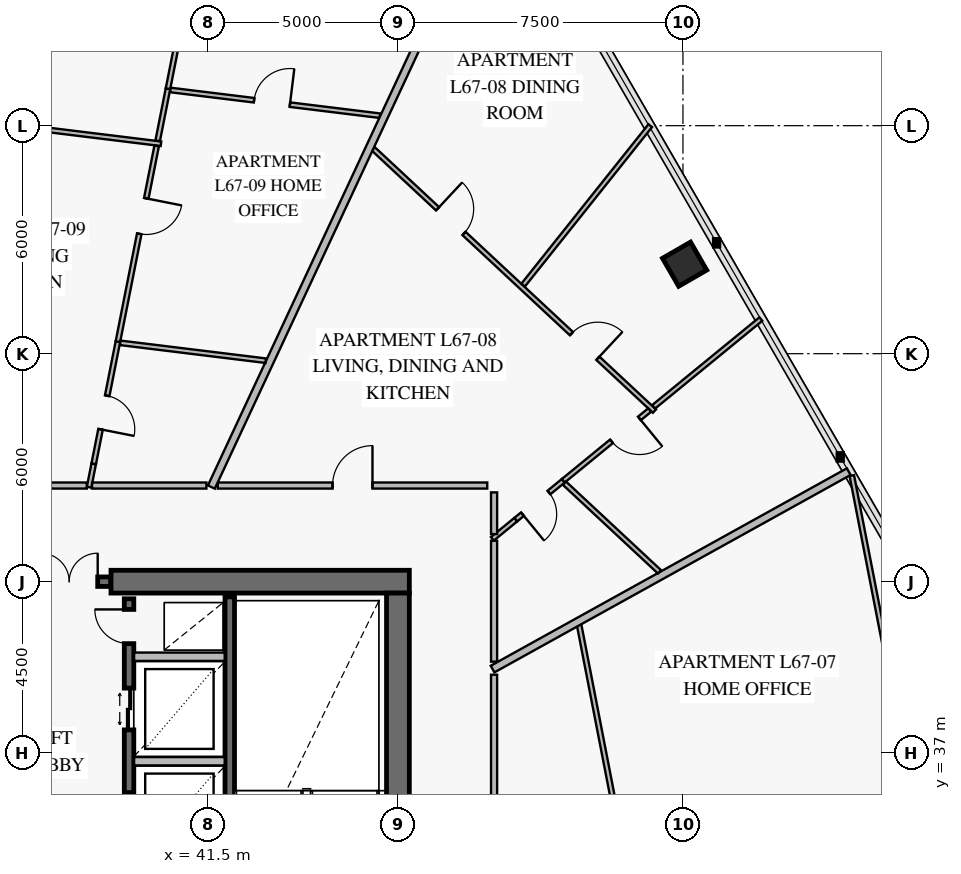
"""IFC4 building model, lengths in metres.
Left out: names, types, materials, properties, quantities, classifications, styles, units other than length and angle.
Written with IfcOpenShell. Run it as: python <this file> out.ifc"""

import sys

from ifc_helpers import new_model, si_unit, direction, frame, frame_2d, origin, origin_2d, place, context, subcontext, project, spatial, rectangle, extrude, element, fill, save


model = new_model("IFC4")
c1 = context("Model", 3, precision=1e-05, world=origin(), true_north=direction((0.0, 1.0)))
c2 = subcontext(c1, "Body", "Model", "MODEL_VIEW")
j1 = project(units=[si_unit("LENGTHUNIT", "METRE"), si_unit("PLANEANGLEUNIT", "RADIAN")], contexts=[c1])
p1 = place(None, origin())
s1 = spatial("IfcSite", under=j1, at=p1, CompositionType="ELEMENT")
p2 = place(p1, origin())
s2 = spatial("IfcBuilding", under=s1, at=p2, CompositionType="ELEMENT")
p3 = place(p2, frame((0.0, 0.0, 265.4)))
s3 = spatial("IfcBuildingStorey", under=s2, at=p3, CompositionType="ELEMENT", Elevation=265.4)
p4 = place(p3, frame((46.8, 41.5, 0.0), z_axis=(0.0, 0.0, 1.0), x_axis=(-1.0, 0.0, 0.0)))
e1 = element("IfcWall", 1, at=p4, inside=s3, PredefinedType="SHEAR", context=c2, shape_type="SweptSolid", body=[
    extrude(rectangle(XDim=7.85, YDim=0.6, at=frame_2d((3.925, 0.0))), origin(), (0.0, 0.0, 1.0), 3.8),
])
p5 = place(p3, frame((46.5, 22.8, 0.0), z_axis=(0.0, 0.0, 1.0), x_axis=(0.0, 1.0, 0.0)))
e2 = element("IfcWall", 2, at=p5, inside=s3, PredefinedType="SHEAR", context=c2, shape_type="SweptSolid", body=[
    extrude(rectangle(XDim=18.4, YDim=0.6, at=frame_2d((9.2, 0.0))), origin(), (0.0, 0.0, 1.0), 3.8),
])
p6 = place(p5, frame((8.95, 0.0, 0.0)))
e3 = element("IfcOpeningElement", 3, at=p6, cuts=e2, PredefinedType="OPENING", context=c2, shape_type="SweptSolid", body=[
    extrude(rectangle(XDim=1.1, YDim=2.15, at=frame_2d((0.55, 1.075))), frame((0.0, 0.312, 0.0), z_axis=(0.0, -1.0, 0.0), x_axis=(1.0, 0.0, 0.0)), (0.0, 0.0, 1.0), 0.624),
])
p7 = place(p3, frame((54.044, 49.855, 0.0), z_axis=(0.0, 0.0, 1.0), x_axis=(-0.5, 0.866025403784, 0.0)))
e4 = element("IfcColumn", 4, at=p7, inside=s3, PredefinedType="COLUMN", context=c2, shape_type="SweptSolid", body=[
    extrude(rectangle(XDim=0.85, YDim=0.85, at=origin_2d()), origin(), (0.0, 0.0, 1.0), 3.55),
])
p8 = place(p3, frame((36.76, 41.5, 0.0), z_axis=(0.0, 0.0, 1.0), x_axis=(1.0, 0.0, 0.0)))
e5 = element("IfcWall", 5, at=p8, inside=s3, PredefinedType="SOLIDWALL", context=c2, shape_type="SweptSolid", body=[
    extrude(rectangle(XDim=2.18, YDim=0.25, at=frame_2d((1.09, 0.0))), origin(), (0.0, 0.0, 1.0), 3.8),
])
p9 = place(p8, frame((0.34, 0.0, 0.0)))
e6 = element("IfcOpeningElement", 6, at=p9, cuts=e5, PredefinedType="OPENING", context=c2, shape_type="SweptSolid", body=[
    extrude(rectangle(XDim=1.5, YDim=2.15, at=frame_2d((0.75, 1.075))), frame((0.0, 0.137, 0.0), z_axis=(0.0, -1.0, 0.0), x_axis=(1.0, 0.0, 0.0)), (0.0, 0.0, 1.0), 0.274),
])
p10 = place(p3, frame((42.075, 31.4, 0.0), z_axis=(0.0, 0.0, 1.0), x_axis=(0.0, 1.0, 0.0)))
e7 = element("IfcWall", 7, at=p10, inside=s3, PredefinedType="SOLIDWALL", context=c2, shape_type="SweptSolid", body=[
    extrude(rectangle(XDim=9.7, YDim=0.25, at=frame_2d((4.85, 0.0))), origin(), (0.0, 0.0, 1.0), 3.8),
])
p11 = place(p3, frame((39.425, 31.4, 0.0), z_axis=(0.0, 0.0, 1.0), x_axis=(0.0, 1.0, 0.0)))
e8 = element("IfcWall", 8, at=p11, inside=s3, PredefinedType="SOLIDWALL", context=c2, shape_type="SweptSolid", body=[
    extrude(rectangle(XDim=9.65, YDim=0.25, at=frame_2d((4.825, 0.0))), origin(), (0.0, 0.0, 1.0), 3.8),
])
p12 = place(p11, frame((0.7, 0.0, 0.0)))
e9 = element("IfcOpeningElement", 9, at=p12, cuts=e8, PredefinedType="OPENING", context=c2, shape_type="SweptSolid", body=[
    extrude(rectangle(XDim=1.1, YDim=2.2, at=frame_2d((0.55, 1.1))), frame((0.0, 0.137, 0.0), z_axis=(0.0, -1.0, 0.0), x_axis=(1.0, 0.0, 0.0)), (0.0, 0.0, 1.0), 0.274),
])
p13 = place(p11, frame((3.45, 0.0, 0.0)))
e10 = element("IfcOpeningElement", 10, at=p13, cuts=e8, PredefinedType="OPENING", context=c2, shape_type="SweptSolid", body=[
    extrude(rectangle(XDim=1.1, YDim=2.2, at=frame_2d((0.55, 1.1))), frame((0.0, 0.137, 0.0), z_axis=(0.0, -1.0, 0.0), x_axis=(1.0, 0.0, 0.0)), (0.0, 0.0, 1.0), 0.274),
])
p14 = place(p11, frame((6.2, 0.0, 0.0)))
e11 = element("IfcOpeningElement", 11, at=p14, cuts=e8, PredefinedType="OPENING", context=c2, shape_type="SweptSolid", body=[
    extrude(rectangle(XDim=1.1, YDim=2.2, at=frame_2d((0.55, 1.1))), frame((0.0, 0.137, 0.0), z_axis=(0.0, -1.0, 0.0), x_axis=(1.0, 0.0, 0.0)), (0.0, 0.0, 1.0), 0.274),
])
p15 = place(p11, frame((8.47, 0.0, 0.0)))
e12 = element("IfcOpeningElement", 12, at=p15, cuts=e8, PredefinedType="OPENING", context=c2, shape_type="SweptSolid", body=[
    extrude(rectangle(XDim=0.9, YDim=2.1, at=frame_2d((0.45, 1.05))), frame((0.0, 0.137, 0.0), z_axis=(0.0, -1.0, 0.0), x_axis=(1.0, 0.0, 0.0)), (0.0, 0.0, 1.0), 0.274),
])
p16 = place(p3, frame((60.257, 34.961, 0.0), z_axis=(0.0, 0.0, 1.0), x_axis=(-0.190833223762, 0.981622473616, 0.0)))
e13 = element("IfcWall", 13, at=p16, inside=s3, PredefinedType="PARTITIONING", context=c2, shape_type="SweptSolid", body=[
    extrude(rectangle(XDim=9.506, YDim=0.12, at=frame_2d((4.753, 0.0))), origin(), (0.0, 0.0, 1.0), 2.93),
])
p17 = place(p16, frame((1.553, 0.0, 0.0)))
e14 = element("IfcOpeningElement", 14, at=p17, cuts=e13, PredefinedType="OPENING", context=c2, shape_type="SweptSolid", body=[
    extrude(rectangle(XDim=0.95, YDim=2.1, at=frame_2d((0.475, 1.05))), frame((0.0, 0.072, 0.0), z_axis=(0.0, -1.0, 0.0), x_axis=(1.0, 0.0, 0.0)), (0.0, 0.0, 1.0), 0.144),
])
p18 = place(p3, frame((53.25, 45.99, 0.0), z_axis=(0.0, 0.0, 1.0), x_axis=(-0.731343343845, 0.682009467246, 0.0)))
e15 = element("IfcWall", 15, at=p18, inside=s3, PredefinedType="PARTITIONING", context=c2, shape_type="SweptSolid", body=[
    extrude(rectangle(XDim=10.115, YDim=0.12, at=frame_2d((5.058, 0.0))), origin(), (0.0, 0.0, 1.0), 2.95),
])
p19 = place(p18, frame((2.037, 0.0, 0.0)))
e16 = element("IfcOpeningElement", 16, at=p19, cuts=e15, PredefinedType="OPENING", context=c2, shape_type="SweptSolid", body=[
    extrude(rectangle(XDim=0.95, YDim=2.1, at=frame_2d((0.475, 1.05))), frame((0.0, 0.072, 0.0), z_axis=(0.0, -1.0, 0.0), x_axis=(1.0, 0.0, 0.0)), (0.0, 0.0, 1.0), 0.144),
])
p20 = place(p18, frame((6.854, 0.0, 0.0)))
e17 = element("IfcOpeningElement", 17, at=p20, cuts=e15, PredefinedType="OPENING", context=c2, shape_type="SweptSolid", body=[
    extrude(rectangle(XDim=0.95, YDim=2.1, at=frame_2d((0.475, 1.05))), frame((0.0, 0.072, 0.0), z_axis=(0.0, -1.0, 0.0), x_axis=(1.0, 0.0, 0.0)), (0.0, 0.0, 1.0), 0.144),
])
p21 = place(p3, frame((49.6, 43.132, 0.0), z_axis=(0.0, 0.0, 1.0), x_axis=(0.773876497014, 0.633336535635, 0.0)))
e18 = element("IfcWall", 18, at=p21, inside=s3, PredefinedType="PARTITIONING", context=c2, shape_type="SweptSolid", body=[
    extrude(rectangle(XDim=1.615, YDim=0.12, at=frame_2d((0.808, 0.0))), origin(), (0.0, 0.0, 1.0), 3.55),
])
p22 = place(p21, frame((0.229, 0.0, 0.0)))
e19 = element("IfcOpeningElement", 19, at=p22, cuts=e18, PredefinedType="OPENING", context=c2, shape_type="SweptSolid", body=[
    extrude(rectangle(XDim=0.9, YDim=2.1, at=frame_2d((0.45, 1.05))), frame((0.0, 0.072, 0.0), z_axis=(0.0, -1.0, 0.0), x_axis=(1.0, 0.0, 0.0)), (0.0, 0.0, 1.0), 0.144),
])
p23 = place(p3, frame((50.85, 44.155, 0.0), z_axis=(0.0, 0.0, 1.0), x_axis=(0.773805447129, 0.633423341844, 0.0)))
e20 = element("IfcWall", 20, at=p23, inside=s3, PredefinedType="PARTITIONING", context=c2, shape_type="SweptSolid", body=[
    extrude(rectangle(XDim=2.937, YDim=0.12, at=frame_2d((1.469, 0.0))), origin(), (0.0, 0.0, 1.0), 3.15),
])
p24 = place(p23, frame((1.641, 0.0, 0.0)))
e21 = element("IfcOpeningElement", 21, at=p24, cuts=e20, PredefinedType="OPENING", context=c2, shape_type="SweptSolid", body=[
    extrude(rectangle(XDim=0.95, YDim=2.1, at=frame_2d((0.475, 1.05))), frame((0.0, 0.072, 0.0), z_axis=(0.0, -1.0, 0.0), x_axis=(1.0, 0.0, 0.0)), (0.0, 0.0, 1.0), 0.144),
])
p25 = place(p3, frame((53.229, 46.102, 0.0), z_axis=(0.0, 0.0, 1.0), x_axis=(0.773858778819, 0.633358184951, 0.0)))
e22 = element("IfcWall", 22, at=p25, inside=s3, PredefinedType="PARTITIONING", context=c2, shape_type="SweptSolid", body=[
    extrude(rectangle(XDim=3.644, YDim=0.12, at=frame_2d((1.822, 0.0))), origin(), (0.0, 0.0, 1.0), 2.93),
])
p26 = place(p3, frame((48.85, 44.03, 0.0), z_axis=(0.0, 0.0, 1.0), x_axis=(-1.0, 0.0, 0.0)))
e23 = element("IfcWall", 23, at=p26, inside=s3, PredefinedType="PARTITIONING", context=c2, shape_type="SweptSolid", body=[
    extrude(rectangle(XDim=7.09, YDim=0.16, at=frame_2d((3.545, 0.0))), origin(), (0.0, 0.0, 1.0), 2.95),
])
p27 = place(p26, frame((3.02, 0.0, 0.0)))
e24 = element("IfcOpeningElement", 24, at=p27, cuts=e23, PredefinedType="OPENING", context=c2, shape_type="SweptSolid", body=[
    extrude(rectangle(XDim=1.05, YDim=2.15, at=frame_2d((0.525, 1.075))), frame((0.0, 0.092, 0.0), z_axis=(0.0, -1.0, 0.0), x_axis=(1.0, 0.0, 0.0)), (0.0, 0.0, 1.0), 0.184),
])
p28 = place(p3, frame((40.265, 53.024, 0.0), z_axis=(0.0, 0.0, 1.0), x_axis=(-0.992544489296, 0.121882881359, 0.0)))
e25 = element("IfcWall", 25, at=p28, inside=s3, PredefinedType="PARTITIONING", context=c2, shape_type="SweptSolid", body=[
    extrude(rectangle(XDim=8.519, YDim=0.12, at=frame_2d((4.26, 0.0))), origin(), (0.0, 0.0, 1.0), 3.55),
])
p29 = place(p28, frame((3.784, 0.0, 0.0)))
e26 = element("IfcOpeningElement", 26, at=p29, cuts=e25, PredefinedType="OPENING", context=c2, shape_type="SweptSolid", body=[
    extrude(rectangle(XDim=0.95, YDim=2.1, at=frame_2d((0.475, 1.05))), frame((0.0, 0.072, 0.0), z_axis=(0.0, -1.0, 0.0), x_axis=(1.0, 0.0, 0.0)), (0.0, 0.0, 1.0), 0.144),
])
p30 = place(p3, frame((38.495, 44.6, 0.0), z_axis=(0.0, 0.0, 1.0), x_axis=(0.194240919575, 0.980953854757, 0.0)))
e27 = element("IfcWall", 27, at=p30, inside=s3, PredefinedType="PARTITIONING", context=c2, shape_type="SweptSolid", body=[
    extrude(rectangle(XDim=3.281, YDim=0.12, at=frame_2d((1.64, 0.0))), origin(), (0.0, 0.0, 1.0), 3.55),
])
p31 = place(p30, frame((0.928, 0.0, 0.0)))
e28 = element("IfcOpeningElement", 28, at=p31, cuts=e27, PredefinedType="OPENING", context=c2, shape_type="SweptSolid", body=[
    extrude(rectangle(XDim=0.9, YDim=2.1, at=frame_2d((0.45, 1.05))), frame((0.0, 0.072, 0.0), z_axis=(0.0, -1.0, 0.0), x_axis=(1.0, 0.0, 0.0)), (0.0, 0.0, 1.0), 0.144),
])
p32 = place(p3, frame((39.132, 47.818, 0.0), z_axis=(0.0, 0.0, 1.0), x_axis=(0.194247124133, 0.980952626158, 0.0)))
e29 = element("IfcWall", 29, at=p32, inside=s3, PredefinedType="PARTITIONING", context=c2, shape_type="SweptSolid", body=[
    extrude(rectangle(XDim=5.251, YDim=0.12, at=frame_2d((2.625, 0.0))), origin(), (0.0, 0.0, 1.0), 3.15),
])
p33 = place(p32, frame((2.892, 0.0, 0.0)))
e30 = element("IfcOpeningElement", 30, at=p33, cuts=e29, PredefinedType="OPENING", context=c2, shape_type="SweptSolid", body=[
    extrude(rectangle(XDim=0.95, YDim=2.1, at=frame_2d((0.475, 1.05))), frame((0.0, 0.072, 0.0), z_axis=(0.0, -1.0, 0.0), x_axis=(1.0, 0.0, 0.0)), (0.0, 0.0, 1.0), 0.144),
])
p34 = place(p3, frame((40.178, 53.103, 0.0), z_axis=(0.0, 0.0, 1.0), x_axis=(0.194299662618, 0.980942221085, 0.0)))
e31 = element("IfcWall", 31, at=p34, inside=s3, PredefinedType="PARTITIONING", context=c2, shape_type="SweptSolid", body=[
    extrude(rectangle(XDim=1.396, YDim=0.12, at=frame_2d((0.698, 0.0))), origin(), (0.0, 0.0, 1.0), 3.55),
])
p35 = place(p3, frame((46.028, 53.762, 0.0), z_axis=(0.0, 0.0, 1.0), x_axis=(-0.992544574318, 0.121882188984, 0.0)))
e32 = element("IfcWall", 32, at=p35, inside=s3, PredefinedType="PARTITIONING", context=c2, shape_type="SweptSolid", body=[
    extrude(rectangle(XDim=5.557, YDim=0.12, at=frame_2d((2.778, 0.0))), origin(), (0.0, 0.0, 1.0), 2.95),
])
p36 = place(p35, frame((2.387, 0.0, 0.0)))
e33 = element("IfcOpeningElement", 33, at=p36, cuts=e32, PredefinedType="OPENING", context=c2, shape_type="SweptSolid", body=[
    extrude(rectangle(XDim=0.95, YDim=2.1, at=frame_2d((0.475, 1.05))), frame((0.0, 0.072, 0.0), z_axis=(0.0, -1.0, 0.0), x_axis=(1.0, 0.0, 0.0)), (0.0, 0.0, 1.0), 0.144),
])
for number, where, z_axis, x_axis in (
    (34, (39.558, 36.775, 0.0), (0.0, 0.0, 1.0), (1.0, 0.0, 0.0)),
    (35, (39.558, 39.525, 0.0), (0.0, 0.0, 1.0), (1.0, 0.0, 0.0)),
):
    element("IfcWall", number, at=place(p3, frame(where, z_axis=z_axis, x_axis=x_axis)), inside=s3, PredefinedType="PARTITIONING", context=c2, shape_type="SweptSolid", body=[
        extrude(rectangle(XDim=2.384, YDim=0.22, at=frame_2d((1.192, 0.0))), origin(), (0.0, 0.0, 1.0), 3.55),
    ])
p37 = place(p3, frame((52.498, 34.036, 0.0), z_axis=(0.0, 0.0, 1.0), x_axis=(-0.190812206092, 0.981626559342, 0.0)))
e36 = element("IfcWall", 36, at=p37, inside=s3, PredefinedType="PARTITIONING", context=c2, shape_type="SweptSolid", body=[
    extrude(rectangle(XDim=6.483, YDim=0.12, at=frame_2d((3.242, 0.0))), origin(), (0.0, 0.0, 1.0), 2.95),
])
p38 = place(p3, frame((48.99, 39.2, 0.0), z_axis=(0.0, 0.0, 1.0), x_axis=(0.874612572959, 0.484822490426, 0.0)))
e37 = element("IfcWall", 37, at=p38, inside=s3, PredefinedType="PARTITIONING", context=c2, shape_type="SweptSolid", body=[
    extrude(rectangle(XDim=10.715, YDim=0.2, at=frame_2d((5.358, 0.0))), origin(), (0.0, 0.0, 1.0), 2.93),
])
p39 = place(p3, frame((49.795, 49.305, 0.0), z_axis=(0.0, 0.0, 1.0), x_axis=(0.623334583936, 0.781955239429, 0.0)))
e38 = element("IfcWall", 38, at=p39, inside=s3, PredefinedType="PARTITIONING", context=c2, shape_type="SweptSolid", body=[
    extrude(rectangle(XDim=5.365, YDim=0.12, at=frame_2d((2.683, 0.0))), origin(), (0.0, 0.0, 1.0), 2.93),
])
p40 = place(p3, frame((48.985, 42.628, 0.0), z_axis=(0.0, 0.0, 1.0), x_axis=(0.773806724765, 0.63342178105, 0.0)))
e39 = element("IfcWall", 39, at=p40, inside=s3, PredefinedType="PARTITIONING", context=c2, shape_type="SweptSolid", body=[
    extrude(rectangle(XDim=0.795, YDim=0.12, at=frame_2d((0.397, 0.0))), origin(), (0.0, 0.0, 1.0), 3.55),
])
p41 = place(p3, frame((53.383, 41.759, 0.0), z_axis=(0.0, 0.0, 1.0), x_axis=(-0.731335264497, 0.68201813092, 0.0)))
e40 = element("IfcWall", 40, at=p41, inside=s3, PredefinedType="PARTITIONING", context=c2, shape_type="SweptSolid", body=[
    extrude(rectangle(XDim=3.421, YDim=0.12, at=frame_2d((1.71, 0.0))), origin(), (0.0, 0.0, 1.0), 3.15),
])
p42 = place(p3, frame((41.591, 43.99, 0.0), z_axis=(0.0, 0.0, 1.0), x_axis=(0.422607909104, 0.906312614479, 0.0)))
e41 = element("IfcWall", 41, at=p42, inside=s3, PredefinedType="PARTITIONING", context=c2, shape_type="SweptSolid", body=[
    extrude(rectangle(XDim=14.977, YDim=0.2, at=frame_2d((7.488, 0.0))), origin(), (0.0, 0.0, 1.0), 2.93),
])
p43 = place(p3, frame((38.373, 43.986, 0.0), z_axis=(0.0, 0.0, 1.0), x_axis=(0.194092051537, 0.98098332072, 0.0)))
e42 = element("IfcWall", 42, at=p43, inside=s3, PredefinedType="PARTITIONING", context=c2, shape_type="SweptSolid", body=[
    extrude(rectangle(XDim=0.626, YDim=0.12, at=frame_2d((0.313, 0.0))), origin(), (0.0, 0.0, 1.0), 3.55),
])
p44 = place(p3, frame((40.45, 54.472, 0.0), z_axis=(0.0, 0.0, 1.0), x_axis=(0.194226638518, 0.980956682474, 0.0)))
e43 = element("IfcWall", 43, at=p44, inside=s3, PredefinedType="PARTITIONING", context=c2, shape_type="SweptSolid", body=[
    extrude(rectangle(XDim=3.156, YDim=0.12, at=frame_2d((1.578, 0.0))), origin(), (0.0, 0.0, 1.0), 2.93),
])
p45 = place(p3, frame((43.022, 47.315, 0.0), z_axis=(0.0, 0.0, 1.0), x_axis=(-0.992546276814, 0.121868323949, 0.0)))
e44 = element("IfcWall", 44, at=p45, inside=s3, PredefinedType="PARTITIONING", context=c2, shape_type="SweptSolid", body=[
    extrude(rectangle(XDim=3.856, YDim=0.12, at=frame_2d((1.928, 0.0))), origin(), (0.0, 0.0, 1.0), 2.95),
])
p46 = place(p3, frame((49.03, 33.622, 0.0), z_axis=(0.0, 0.0, 1.0), x_axis=(0.0, 1.0, 0.0)))
e45 = element("IfcWall", 45, at=p46, inside=s3, PredefinedType="PARTITIONING", context=c2, shape_type="SweptSolid", body=[
    extrude(rectangle(XDim=5.43, YDim=0.16, at=frame_2d((2.715, 0.0))), origin(), (0.0, 0.0, 1.0), 2.95),
])
p47 = place(p3, frame((49.03, 42.753, 0.0), z_axis=(0.0, 0.0, 1.0), x_axis=(0.0, 1.0, 0.0)))
e46 = element("IfcWall", 46, at=p47, inside=s3, PredefinedType="PARTITIONING", context=c2, shape_type="SweptSolid", body=[
    extrude(rectangle(XDim=1.097, YDim=0.16, at=frame_2d((0.549, 0.0))), origin(), (0.0, 0.0, 1.0), 3.55),
])
p48 = place(p3, frame((49.03, 39.395, 0.0), z_axis=(0.0, 0.0, 1.0), x_axis=(0.0, 1.0, 0.0)))
e47 = element("IfcWall", 47, at=p48, inside=s3, PredefinedType="PARTITIONING", context=c2, shape_type="SweptSolid", body=[
    extrude(rectangle(XDim=3.182, YDim=0.16, at=frame_2d((1.591, 0.0))), origin(), (0.0, 0.0, 1.0), 3.55),
])
p49 = place(p3, frame((38.313, 44.03, 0.0), z_axis=(0.0, 0.0, 1.0), x_axis=(-1.0, 0.0, 0.0)))
e48 = element("IfcWall", 48, at=p49, inside=s3, PredefinedType="PARTITIONING", context=c2, shape_type="SweptSolid", body=[
    extrude(rectangle(XDim=0.945, YDim=0.16, at=frame_2d((0.472, 0.0))), origin(), (0.0, 0.0, 1.0), 3.55),
])
p50 = place(p3, frame((41.46, 44.03, 0.0), z_axis=(0.0, 0.0, 1.0), x_axis=(-1.0, 0.0, 0.0)))
e49 = element("IfcWall", 49, at=p50, inside=s3, PredefinedType="PARTITIONING", context=c2, shape_type="SweptSolid", body=[
    extrude(rectangle(XDim=3.009, YDim=0.16, at=frame_2d((1.504, 0.0))), origin(), (0.0, 0.0, 1.0), 2.95),
])
p51 = place(p9, origin())
e50 = element("IfcDoor", 50, at=p51, inside=s3, OperationType="DOUBLE_DOOR_SINGLE_SWING", PredefinedType="DOOR", context=c2, shape_type="SweptSolid", body=[
    extrude(rectangle(XDim=1.5, YDim=2.15, at=frame_2d((0.75, 1.075))), frame((0.0, 0.025, 0.0), z_axis=(0.0, -1.0, 0.0), x_axis=(1.0, 0.0, 0.0)), (0.0, 0.0, 1.0), 0.05),
])
fill(e6, e50)
p52 = place(p13, origin())
e51 = element("IfcDoor", 51, at=p52, inside=s3, OperationType="DOUBLE_DOOR_SLIDING", PredefinedType="DOOR", context=c2, shape_type="SweptSolid", body=[
    extrude(rectangle(XDim=1.1, YDim=2.2, at=frame_2d((0.55, 1.1))), frame((0.0, 0.025, 0.0), z_axis=(0.0, -1.0, 0.0), x_axis=(1.0, 0.0, 0.0)), (0.0, 0.0, 1.0), 0.05),
])
fill(e10, e51)
p53 = place(p14, origin())
e52 = element("IfcDoor", 52, at=p53, inside=s3, OperationType="DOUBLE_DOOR_SLIDING", PredefinedType="DOOR", context=c2, shape_type="SweptSolid", body=[
    extrude(rectangle(XDim=1.1, YDim=2.2, at=frame_2d((0.55, 1.1))), frame((0.0, 0.025, 0.0), z_axis=(0.0, -1.0, 0.0), x_axis=(1.0, 0.0, 0.0)), (0.0, 0.0, 1.0), 0.05),
])
fill(e11, e52)
p54 = place(p15, origin())
e53 = element("IfcDoor", 53, at=p54, inside=s3, OperationType="SINGLE_SWING_RIGHT", PredefinedType="DOOR", context=c2, shape_type="SweptSolid", body=[
    extrude(rectangle(XDim=0.9, YDim=2.1, at=frame_2d((0.45, 1.05))), frame((0.0, 0.025, 0.0), z_axis=(0.0, -1.0, 0.0), x_axis=(1.0, 0.0, 0.0)), (0.0, 0.0, 1.0), 0.05),
])
fill(e12, e53)
p55 = place(p19, frame((0.95, 0.0, 0.0), z_axis=(0.0, 0.0, 1.0), x_axis=(-1.0, 0.0, 0.0)))
e54 = element("IfcDoor", 54, at=p55, inside=s3, OperationType="SINGLE_SWING_RIGHT", PredefinedType="DOOR", context=c2, shape_type="SweptSolid", body=[
    extrude(rectangle(XDim=0.95, YDim=2.1, at=frame_2d((0.475, 1.05))), frame((0.0, 0.025, 0.0), z_axis=(0.0, -1.0, 0.0), x_axis=(1.0, 0.0, 0.0)), (0.0, 0.0, 1.0), 0.05),
])
fill(e16, e54)
p56 = place(p20, frame((0.95, 0.0, 0.0), z_axis=(0.0, 0.0, 1.0), x_axis=(-1.0, 0.0, 0.0)))
e55 = element("IfcDoor", 55, at=p56, inside=s3, OperationType="SINGLE_SWING_LEFT", PredefinedType="DOOR", context=c2, shape_type="SweptSolid", body=[
    extrude(rectangle(XDim=0.95, YDim=2.1, at=frame_2d((0.475, 1.05))), frame((0.0, 0.025, 0.0), z_axis=(0.0, -1.0, 0.0), x_axis=(1.0, 0.0, 0.0)), (0.0, 0.0, 1.0), 0.05),
])
fill(e17, e55)
p57 = place(p22, frame((0.9, 0.0, 0.0), z_axis=(0.0, 0.0, 1.0), x_axis=(-1.0, 0.0, 0.0)))
e56 = element("IfcDoor", 56, at=p57, inside=s3, OperationType="SINGLE_SWING_RIGHT", PredefinedType="DOOR", context=c2, shape_type="SweptSolid", body=[
    extrude(rectangle(XDim=0.9, YDim=2.1, at=frame_2d((0.45, 1.05))), frame((0.0, 0.025, 0.0), z_axis=(0.0, -1.0, 0.0), x_axis=(1.0, 0.0, 0.0)), (0.0, 0.0, 1.0), 0.05),
])
fill(e19, e56)
p58 = place(p24, frame((0.95, 0.0, 0.0), z_axis=(0.0, 0.0, 1.0), x_axis=(-1.0, 0.0, 0.0)))
e57 = element("IfcDoor", 57, at=p58, inside=s3, OperationType="SINGLE_SWING_LEFT", PredefinedType="DOOR", context=c2, shape_type="SweptSolid", body=[
    extrude(rectangle(XDim=0.95, YDim=2.1, at=frame_2d((0.475, 1.05))), frame((0.0, 0.025, 0.0), z_axis=(0.0, -1.0, 0.0), x_axis=(1.0, 0.0, 0.0)), (0.0, 0.0, 1.0), 0.05),
])
fill(e21, e57)
p59 = place(p27, frame((1.05, 0.0, 0.0), z_axis=(0.0, 0.0, 1.0), x_axis=(-1.0, 0.0, 0.0)))
e58 = element("IfcDoor", 58, at=p59, inside=s3, OperationType="SINGLE_SWING_RIGHT", PredefinedType="DOOR", context=c2, shape_type="SweptSolid", body=[
    extrude(rectangle(XDim=1.05, YDim=2.15, at=frame_2d((0.525, 1.075))), frame((0.0, 0.025, 0.0), z_axis=(0.0, -1.0, 0.0), x_axis=(1.0, 0.0, 0.0)), (0.0, 0.0, 1.0), 0.05),
])
fill(e24, e58)
p60 = place(p31, frame((0.9, 0.0, 0.0), z_axis=(0.0, 0.0, 1.0), x_axis=(-1.0, 0.0, 0.0)))
e59 = element("IfcDoor", 59, at=p60, inside=s3, OperationType="SINGLE_SWING_RIGHT", PredefinedType="DOOR", context=c2, shape_type="SweptSolid", body=[
    extrude(rectangle(XDim=0.9, YDim=2.1, at=frame_2d((0.45, 1.05))), frame((0.0, 0.025, 0.0), z_axis=(0.0, -1.0, 0.0), x_axis=(1.0, 0.0, 0.0)), (0.0, 0.0, 1.0), 0.05),
])
fill(e28, e59)
p61 = place(p33, frame((0.95, 0.0, 0.0), z_axis=(0.0, 0.0, 1.0), x_axis=(-1.0, 0.0, 0.0)))
e60 = element("IfcDoor", 60, at=p61, inside=s3, OperationType="SINGLE_SWING_LEFT", PredefinedType="DOOR", context=c2, shape_type="SweptSolid", body=[
    extrude(rectangle(XDim=0.95, YDim=2.1, at=frame_2d((0.475, 1.05))), frame((0.0, 0.025, 0.0), z_axis=(0.0, -1.0, 0.0), x_axis=(1.0, 0.0, 0.0)), (0.0, 0.0, 1.0), 0.05),
])
fill(e30, e60)
p62 = place(p36, frame((0.95, 0.0, 0.0), z_axis=(0.0, 0.0, 1.0), x_axis=(-1.0, 0.0, 0.0)))
e61 = element("IfcDoor", 61, at=p62, inside=s3, OperationType="SINGLE_SWING_RIGHT", PredefinedType="DOOR", context=c2, shape_type="SweptSolid", body=[
    extrude(rectangle(XDim=0.95, YDim=2.1, at=frame_2d((0.475, 1.05))), frame((0.0, 0.025, 0.0), z_axis=(0.0, -1.0, 0.0), x_axis=(1.0, 0.0, 0.0)), (0.0, 0.0, 1.0), 0.05),
])
fill(e33, e61)
save(model, sys.argv[1])
